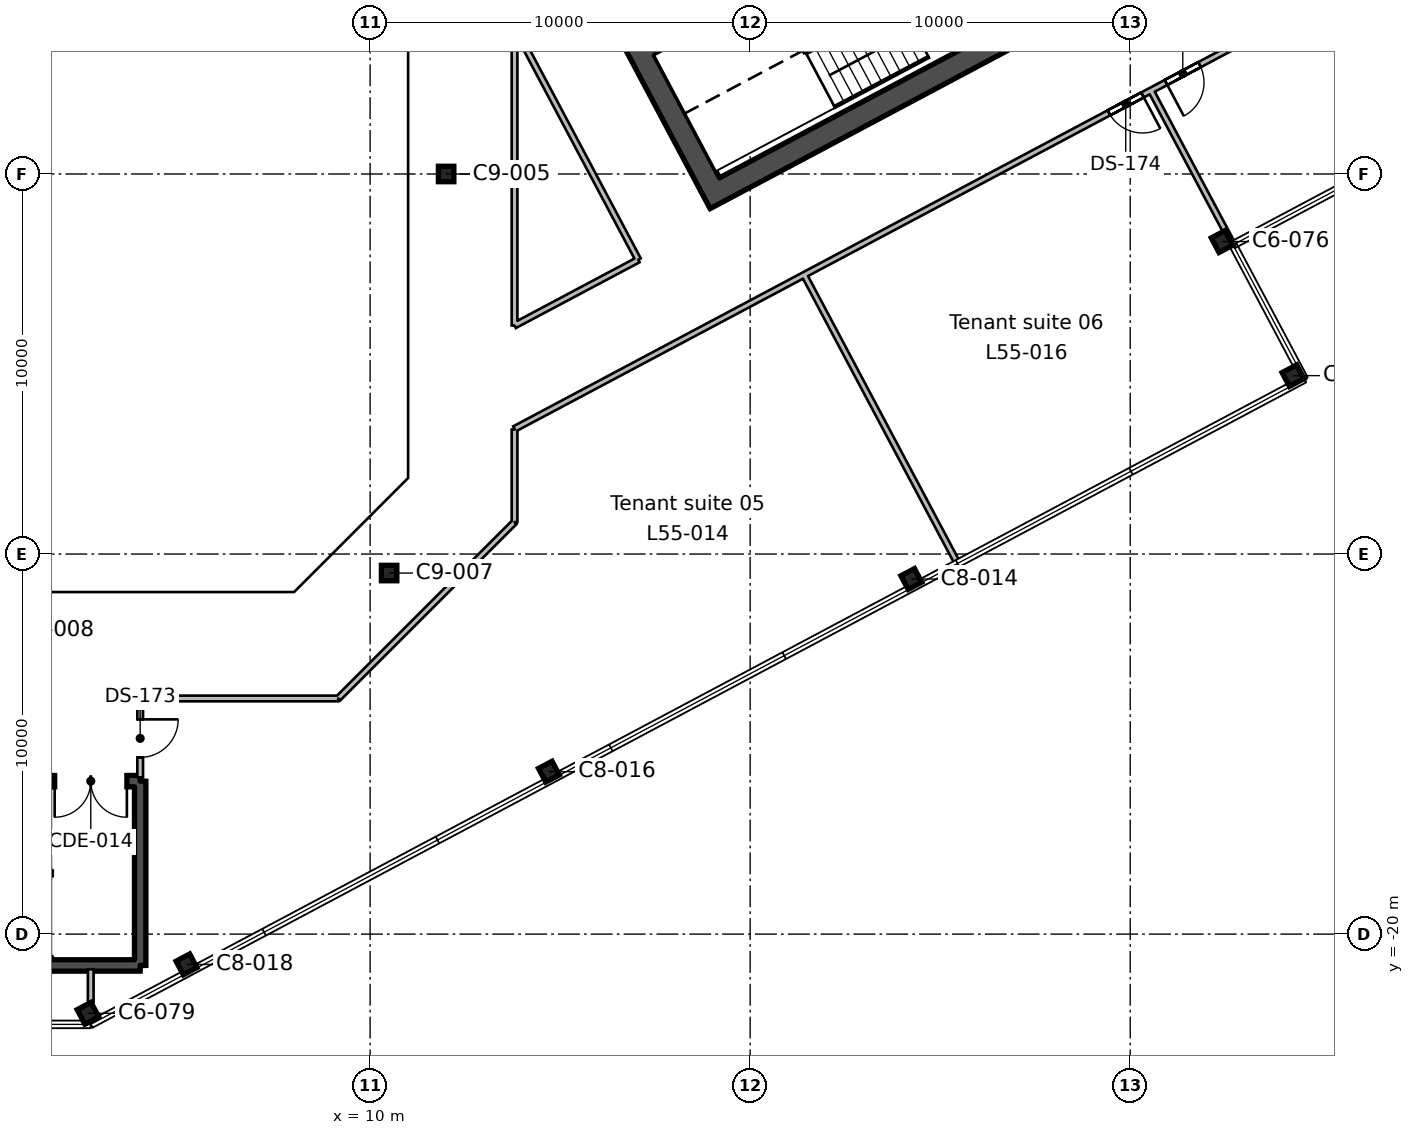
"""IFC4 building model, lengths in metres.
Left out: names, types, materials, properties, quantities, classifications, styles, units other than length and angle.
Written with IfcOpenShell. Run it as: python <this file> out.ifc"""

import sys

from ifc_helpers import new_model, si_unit, direction, frame, frame_2d, origin, origin_2d, place, context, subcontext, project, spatial, rectangle, hollow_rectangle, i_section, extrude, element, fill, save


model = new_model("IFC4")
c1 = context("Model", 3, precision=1e-05, world=origin(), true_north=direction((0.0, 1.0)))
c2 = subcontext(c1, "Body", "Model", "MODEL_VIEW")
j1 = project(units=[si_unit("LENGTHUNIT", "METRE"), si_unit("PLANEANGLEUNIT", "RADIAN")], contexts=[c1])
p1 = place(None, origin())
s1 = spatial("IfcSite", under=j1, at=p1, CompositionType="ELEMENT")
p2 = place(p1, origin())
s2 = spatial("IfcBuilding", under=s1, at=p2, CompositionType="ELEMENT")
p3 = place(p2, frame((0.0, 0.0, 248.1)))
s3 = spatial("IfcBuildingStorey", under=s2, at=p3, CompositionType="ELEMENT", Elevation=248.1)
p4 = place(p3, frame((2.576, -22.084, 0.0), z_axis=(0.0, 0.0, 1.0), x_axis=(0.882947592859, 0.469471562786, 0.0)))
e1 = element("IfcColumn", 1, at=p4, inside=s3, PredefinedType="COLUMN", context=c2, shape_type="SweptSolid", body=[
    extrude(i_section(OverallWidth=0.412, OverallDepth=0.434, WebThickness=0.036, FlangeThickness=0.057, FilletRadius=0.015, at=origin_2d()), origin(), (0.0, 0.0, 1.0), 3.9),
])
for number, where, z_axis, x_axis in (
    (2, (5.169, -20.798, 0.0), (0.0, 0.0, 1.0), (0.883, 0.469, 0.0)),
    (3, (14.705, -15.727, 0.0), (0.0, 0.0, 1.0), (0.883, 0.469, 0.0)),
    (4, (24.241, -10.657, 0.0), (0.0, 0.0, 1.0), (0.883, 0.469, 0.0)),
):
    element("IfcColumn", number, at=place(p3, frame(where, z_axis=z_axis, x_axis=x_axis)), inside=s3, PredefinedType="COLUMN", context=c2, shape_type="SweptSolid", body=[
        extrude(i_section(OverallWidth=0.404, OverallDepth=0.406, WebThickness=0.027, FlangeThickness=0.044, FilletRadius=0.015, at=origin_2d()), origin(), (0.0, 0.0, 1.0), 3.9),
    ])
p5 = place(p3, frame((10.5, -10.5, 0.0), z_axis=(0.0, 0.0, 1.0), x_axis=(1.0, 0.0, 0.0)))
e5 = element("IfcColumn", 5, at=p5, inside=s3, PredefinedType="COLUMN", context=c2, shape_type="SweptSolid", body=[
    extrude(hollow_rectangle(XDim=0.406, YDim=0.406, WallThickness=0.015, InnerFilletRadius=0.007, OuterFilletRadius=0.022, at=origin_2d()), origin(), (0.0, 0.0, 1.0), 3.9),
])
for number, where, z_axis, x_axis in (
    (6, (34.285, -5.306, 0.0), (0.0, 0.0, 1.0), (-0.469, 0.883, 0.0)),
    (7, (32.417, -1.777, 0.0), (0.0, 0.0, 1.0), (0.883, 0.469, 0.0)),
):
    element("IfcColumn", number, at=place(p3, frame(where, z_axis=z_axis, x_axis=x_axis)), inside=s3, PredefinedType="COLUMN", context=c2, shape_type="SweptSolid", body=[
        extrude(i_section(OverallWidth=0.412, OverallDepth=0.434, WebThickness=0.036, FlangeThickness=0.057, FilletRadius=0.015, at=origin_2d()), origin(), (0.0, 0.0, 1.0), 3.9),
    ])
p6 = place(p3, frame((12.0, 0.0, 0.0), z_axis=(0.0, 0.0, 1.0), x_axis=(1.0, 0.0, 0.0)))
e8 = element("IfcColumn", 8, at=p6, inside=s3, PredefinedType="COLUMN", context=c2, shape_type="SweptSolid", body=[
    extrude(hollow_rectangle(XDim=0.406, YDim=0.406, WallThickness=0.015, InnerFilletRadius=0.007, OuterFilletRadius=0.022, at=origin_2d()), origin(), (0.0, 0.0, 1.0), 3.9),
])
p7 = place(p3, frame((19.211, -0.771, 0.0), z_axis=(0.0, 0.0, 1.0), x_axis=(-0.469463742137, 0.882951751127, 0.0)))
e9 = element("IfcWall", 9, at=p7, inside=s3, PredefinedType="SHEAR", context=c2, shape_type="SweptSolid", body=[
    extrude(rectangle(XDim=19.4, YDim=0.6, at=frame_2d((9.7, 0.0))), origin(), (0.0, 0.0, 1.0), 3.9),
])
p8 = place(p7, frame((6.7, 0.0, 0.0)))
e10 = element("IfcOpeningElement", 10, at=p8, cuts=e9, PredefinedType="OPENING", context=c2, shape_type="SweptSolid", body=[
    extrude(rectangle(XDim=2.4, YDim=2.4, at=frame_2d((1.2, 1.2))), frame((0.0, 0.31, 0.0), z_axis=(0.0, -1.0, 0.0), x_axis=(1.0, 0.0, 0.0)), (0.0, 0.0, 1.0), 0.62),
])
p9 = place(p3, frame((19.335, -0.366, 0.0), z_axis=(0.0, 0.0, 1.0), x_axis=(0.88294509198, 0.469476266226, 0.0)))
e11 = element("IfcWall", 11, at=p9, inside=s3, PredefinedType="SHEAR", context=c2, shape_type="SweptSolid", body=[
    extrude(rectangle(XDim=20.2, YDim=0.6, at=frame_2d((10.1, 0.0))), origin(), (0.0, 0.0, 1.0), 3.9),
])
p10 = place(p3, frame((17.434, 3.21, 0.0), z_axis=(0.0, 0.0, 1.0), x_axis=(0.882940221191, 0.469485426614, 0.0)))
e12 = element("IfcWall", 12, at=p10, inside=s3, PredefinedType="SHEAR", context=c2, shape_type="SweptSolid", body=[
    extrude(rectangle(XDim=8.0, YDim=0.2, at=frame_2d((4.0, 0.0))), origin(), (0.0, 0.0, 1.0), 3.9),
])
p11 = place(p3, frame((3.95, -15.975, 0.0), z_axis=(0.0, 0.0, 1.0), x_axis=(0.0, -1.0, 0.0)))
e13 = element("IfcWall", 13, at=p11, inside=s3, PredefinedType="SHEAR", context=c2, shape_type="SweptSolid", body=[
    extrude(rectangle(XDim=4.85, YDim=0.3, at=frame_2d((2.425, 0.0))), origin(), (0.0, 0.0, 1.0), 3.9),
])
p12 = place(p3, frame((3.95, -20.825, 0.0), z_axis=(0.0, 0.0, 1.0), x_axis=(-1.0, 0.0, 0.0)))
e14 = element("IfcWall", 14, at=p12, inside=s3, PredefinedType="SHEAR", context=c2, shape_type="SweptSolid", body=[
    extrude(rectangle(XDim=8.3, YDim=0.3, at=frame_2d((4.15, 0.0))), origin(), (0.0, 0.0, 1.0), 3.9),
])
p13 = place(p3, frame((-4.35, -15.975, 0.0), z_axis=(0.0, 0.0, 1.0), x_axis=(1.0, 0.0, 0.0)))
e15 = element("IfcWall", 15, at=p13, inside=s3, PredefinedType="SHEAR", context=c2, shape_type="SweptSolid", body=[
    extrude(rectangle(XDim=8.3, YDim=0.3, at=frame_2d((4.15, 0.0))), origin(), (0.0, 0.0, 1.0), 3.9),
])
p14 = place(p13, frame((6.05, 0.0, 0.0)))
e16 = element("IfcOpeningElement", 16, at=p14, cuts=e15, PredefinedType="OPENING", context=c2, shape_type="SweptSolid", body=[
    extrude(rectangle(XDim=1.9, YDim=2.1, at=frame_2d((0.95, 1.05))), frame((0.0, 0.16, 0.0), z_axis=(0.0, -1.0, 0.0), x_axis=(1.0, 0.0, 0.0)), (0.0, 0.0, 1.0), 0.32),
])
p15 = place(p3, frame((2.649, -21.799, 0.0), z_axis=(0.0, 0.0, 1.0), x_axis=(0.0, 1.0, 0.0)))
e17 = element("IfcWall", 17, at=p15, inside=s3, PredefinedType="PARTITIONING", context=c2, shape_type="SweptSolid", body=[
    extrude(rectangle(XDim=0.874, YDim=0.15, at=frame_2d((0.437, 0.0))), origin(), (0.0, 0.0, 1.0), 3.45),
])
p16 = place(p3, frame((3.95, -13.8, 0.0), z_axis=(0.0, 0.0, 1.0), x_axis=(0.0, -1.0, 0.0)))
e18 = element("IfcWall", 18, at=p16, inside=s3, PredefinedType="PARTITIONING", context=c2, shape_type="SweptSolid", body=[
    extrude(rectangle(XDim=2.075, YDim=0.15, at=frame_2d((1.038, 0.0))), origin(), (0.0, 0.0, 1.0), 3.45),
])
p17 = place(p16, frame((0.55, 0.0, 0.0)))
e19 = element("IfcOpeningElement", 19, at=p17, cuts=e18, PredefinedType="OPENING", context=c2, shape_type="SweptSolid", body=[
    extrude(rectangle(XDim=1.0, YDim=2.1, at=frame_2d((0.5, 1.05))), frame((0.0, 0.085, 0.0), z_axis=(0.0, -1.0, 0.0), x_axis=(1.0, 0.0, 0.0)), (0.0, 0.0, 1.0), 0.17),
])
p18 = place(p3, frame((13.8, -6.723, 0.0), z_axis=(0.0, 0.0, 1.0), x_axis=(0.0, -1.0, 0.0)))
e20 = element("IfcWall", 20, at=p18, inside=s3, PredefinedType="PARTITIONING", context=c2, shape_type="SweptSolid", body=[
    extrude(rectangle(XDim=2.437, YDim=0.15, at=frame_2d((1.219, 0.0))), origin(), (0.0, 0.0, 1.0), 3.45),
])
p19 = place(p3, frame((13.8, -9.16, 0.0), z_axis=(0.0, 0.0, 1.0), x_axis=(-0.707106781187, -0.707106781187, 0.0)))
e21 = element("IfcWall", 21, at=p19, inside=s3, PredefinedType="PARTITIONING", context=c2, shape_type="SweptSolid", body=[
    extrude(rectangle(XDim=6.562, YDim=0.15, at=frame_2d((3.281, 0.0))), origin(), (0.0, 0.0, 1.0), 3.45),
])
p20 = place(p3, frame((9.16, -13.8, 0.0), z_axis=(0.0, 0.0, 1.0), x_axis=(-1.0, 0.0, 0.0)))
e22 = element("IfcWall", 22, at=p20, inside=s3, PredefinedType="PARTITIONING", context=c2, shape_type="SweptSolid", body=[
    extrude(rectangle(XDim=5.175, YDim=0.15, at=frame_2d((2.587, 0.0))), origin(), (0.0, 0.0, 1.0), 3.45),
])
p21 = place(p3, frame((21.421, -2.654, 0.0), z_axis=(0.0, 0.0, 1.0), x_axis=(0.469445946219, -0.882961212952, 0.0)))
e23 = element("IfcWall", 23, at=p21, inside=s3, PredefinedType="PARTITIONING", context=c2, shape_type="SweptSolid", body=[
    extrude(rectangle(XDim=8.8, YDim=0.15, at=frame_2d((4.4, 0.0))), origin(), (0.0, 0.0, 1.0), 3.45),
])
p22 = place(p3, frame((48.38, 11.679, 0.0), z_axis=(0.0, 0.0, 1.0), x_axis=(-0.882962559816, -0.469443412951, 0.0)))
e24 = element("IfcWall", 24, at=p22, inside=s3, PredefinedType="PARTITIONING", context=c2, shape_type="SweptSolid", body=[
    extrude(rectangle(XDim=39.163, YDim=0.15, at=frame_2d((19.582, 0.0))), origin(), (0.0, 0.0, 1.0), 3.45),
])
p23 = place(p22, frame((20.45, 0.0, 0.0)))
e25 = element("IfcOpeningElement", 25, at=p23, cuts=e24, PredefinedType="OPENING", context=c2, shape_type="SweptSolid", body=[
    extrude(rectangle(XDim=1.0, YDim=2.1, at=frame_2d((0.5, 1.05))), frame((0.0, 0.085, 0.0), z_axis=(0.0, -1.0, 0.0), x_axis=(1.0, 0.0, 0.0)), (0.0, 0.0, 1.0), 0.17),
])
p24 = place(p22, frame((18.75, 0.0, 0.0)))
e26 = element("IfcOpeningElement", 26, at=p24, cuts=e24, PredefinedType="OPENING", context=c2, shape_type="SweptSolid", body=[
    extrude(rectangle(XDim=1.0, YDim=2.1, at=frame_2d((0.5, 1.05))), frame((0.0, 0.085, 0.0), z_axis=(0.0, -1.0, 0.0), x_axis=(1.0, 0.0, 0.0)), (0.0, 0.0, 1.0), 0.17),
])
p25 = place(p3, frame((30.544, 2.197, 0.0), z_axis=(0.0, 0.0, 1.0), x_axis=(0.469518415739, -0.882922679107, 0.0)))
e27 = element("IfcWall", 27, at=p25, inside=s3, PredefinedType="PARTITIONING", context=c2, shape_type="SweptSolid", body=[
    extrude(rectangle(XDim=4.882, YDim=0.15, at=frame_2d((2.441, 0.0))), origin(), (0.0, 0.0, 1.0), 3.45),
])
p26 = place(p3, frame((17.056, -2.257, 0.0), z_axis=(0.0, 0.0, 1.0), x_axis=(-0.469433160251, 0.882968010778, 0.0)))
e28 = element("IfcWall", 28, at=p26, inside=s3, PredefinedType="PARTITIONING", context=c2, shape_type="SweptSolid", body=[
    extrude(rectangle(XDim=6.936, YDim=0.15, at=frame_2d((3.468, 0.0))), origin(), (0.0, 0.0, 1.0), 3.45),
])
p27 = place(p3, frame((13.8, 3.867, 0.0), z_axis=(0.0, 0.0, 1.0), x_axis=(0.0, -1.0, 0.0)))
e29 = element("IfcWall", 29, at=p27, inside=s3, PredefinedType="PARTITIONING", context=c2, shape_type="SweptSolid", body=[
    extrude(rectangle(XDim=7.855, YDim=0.15, at=frame_2d((3.927, 0.0))), origin(), (0.0, 0.0, 1.0), 3.45),
])
p28 = place(p3, frame((13.8, -3.988, 0.0), z_axis=(0.0, 0.0, 1.0), x_axis=(0.882971660552, 0.469426295239, 0.0)))
e30 = element("IfcWall", 30, at=p28, inside=s3, PredefinedType="PARTITIONING", context=c2, shape_type="SweptSolid", body=[
    extrude(rectangle(XDim=3.688, YDim=0.15, at=frame_2d((1.844, 0.0))), origin(), (0.0, 0.0, 1.0), 3.45),
])
p29 = place(p14, frame((1.9, 0.0, 0.0), z_axis=(0.0, 0.0, 1.0), x_axis=(-1.0, 0.0, 0.0)))
e31 = element("IfcDoor", 31, at=p29, inside=s3, OperationType="DOUBLE_DOOR_SINGLE_SWING", PredefinedType="DOOR", context=c2, shape_type="SweptSolid", body=[
    extrude(rectangle(XDim=1.9, YDim=2.1, at=frame_2d((0.95, 1.05))), frame((0.0, 0.025, 0.0), z_axis=(0.0, -1.0, 0.0), x_axis=(1.0, 0.0, 0.0)), (0.0, 0.0, 1.0), 0.05),
])
fill(e16, e31)
p30 = place(p17, origin())
e32 = element("IfcDoor", 32, at=p30, inside=s3, OperationType="SINGLE_SWING_LEFT", PredefinedType="DOOR", context=c2, shape_type="SweptSolid", body=[
    extrude(rectangle(XDim=1.0, YDim=2.1, at=frame_2d((0.5, 1.05))), frame((0.0, 0.025, 0.0), z_axis=(0.0, -1.0, 0.0), x_axis=(1.0, 0.0, 0.0)), (0.0, 0.0, 1.0), 0.05),
])
fill(e19, e32)
p31 = place(p23, origin())
e33 = element("IfcDoor", 33, at=p31, inside=s3, OperationType="SINGLE_SWING_LEFT", PredefinedType="DOOR", context=c2, shape_type="SweptSolid", body=[
    extrude(rectangle(XDim=1.0, YDim=2.1, at=frame_2d((0.5, 1.05))), frame((0.0, 0.025, 0.0), z_axis=(0.0, -1.0, 0.0), x_axis=(1.0, 0.0, 0.0)), (0.0, 0.0, 1.0), 0.05),
])
fill(e25, e33)
p32 = place(p24, origin())
e34 = element("IfcDoor", 34, at=p32, inside=s3, OperationType="SINGLE_SWING_RIGHT", PredefinedType="DOOR", context=c2, shape_type="SweptSolid", body=[
    extrude(rectangle(XDim=1.0, YDim=2.1, at=frame_2d((0.5, 1.05))), frame((0.0, 0.025, 0.0), z_axis=(0.0, -1.0, 0.0), x_axis=(1.0, 0.0, 0.0)), (0.0, 0.0, 1.0), 0.05),
])
fill(e26, e34)
save(model, sys.argv[1])
